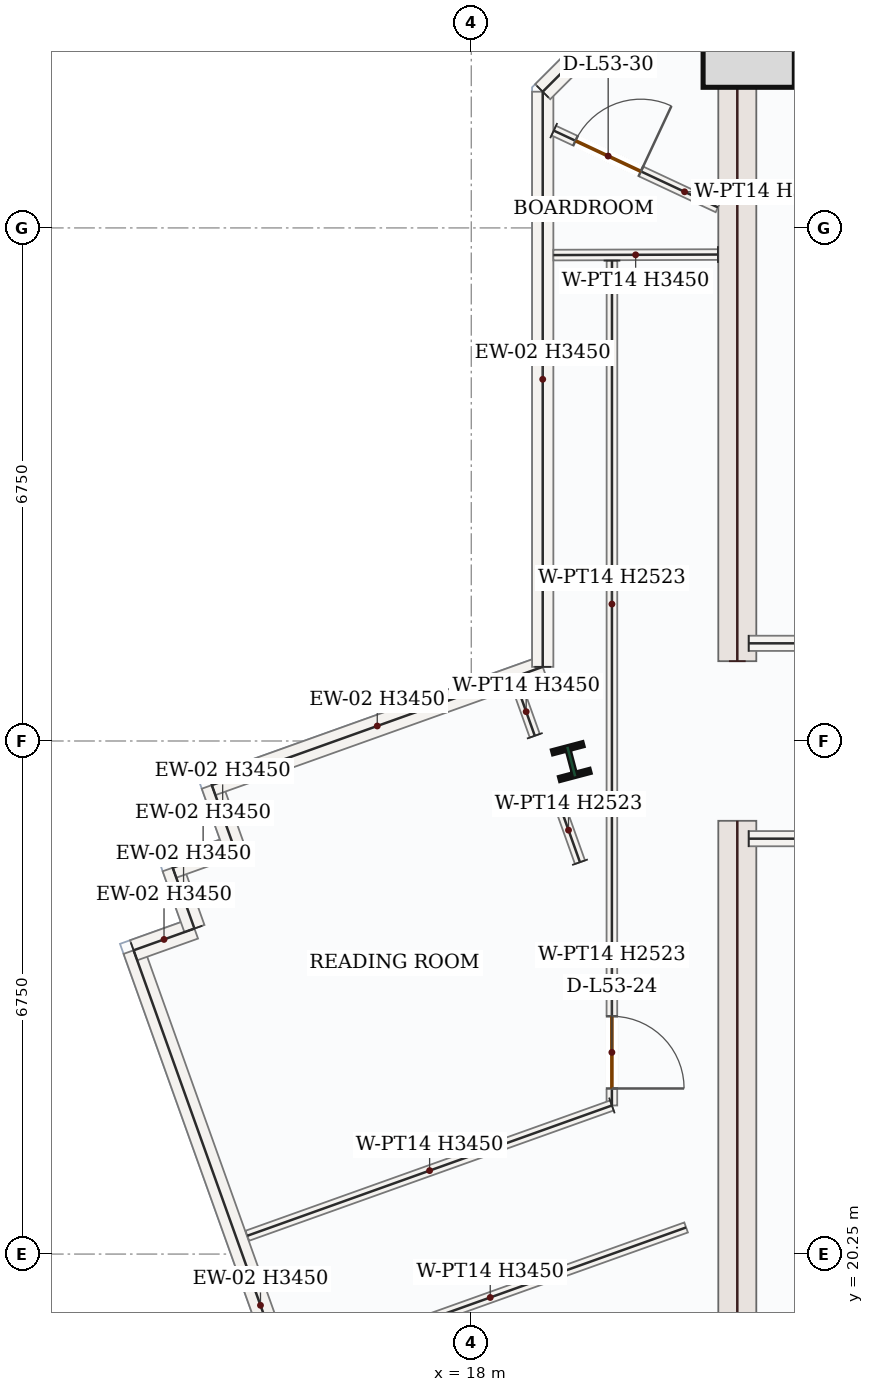
"""IFC4 building model, lengths in metres.
Left out: names, types, materials, properties, quantities, classifications, styles, units other than length and angle.
Written with IfcOpenShell. Run it as: python <this file> out.ifc"""

import sys

from ifc_helpers import new_model, si_unit, direction, frame, frame_2d, origin, origin_2d, place, context, subcontext, project, spatial, rectangle, i_section, extrude, source, transform, mapped, element, fill, save


model = new_model("IFC4")
c1 = context("Model", 3, precision=1e-05, world=origin(), true_north=direction((0.0, 1.0)))
c2 = subcontext(c1, "Body", "Model", "MODEL_VIEW")
j1 = project(units=[si_unit("LENGTHUNIT", "METRE"), si_unit("PLANEANGLEUNIT", "RADIAN")], contexts=[c1])
p1 = place(None, origin())
s1 = spatial("IfcSite", under=j1, at=p1, CompositionType="ELEMENT")
p2 = place(p1, origin())
s2 = spatial("IfcBuilding", under=s1, at=p2, CompositionType="ELEMENT")
p3 = place(p2, frame((0.0, 0.0, 225.3)))
s3 = spatial("IfcBuildingStorey", under=s2, at=p3, CompositionType="ELEMENT", Elevation=225.3)
m1 = source(origin(), c2, "Body", "SweptSolid", [
    extrude(rectangle(XDim=8.55, YDim=0.5, at=frame_2d((4.275, 0.0))), origin(), (0.0, 0.0, 1.0), 3.45),
])
for number, where, z_axis, x_axis in (
    (1, (21.5, 17.4, 0.0), (0.0, 0.0, 1.0), (0.0, 1.0, 0.0)),
    (2, (21.5, 28.05, 0.0), (0.0, 0.0, 1.0), (0.0, 1.0, 0.0)),
):
    element("IfcWall", number, at=place(p3, frame(where, z_axis=z_axis, x_axis=x_axis)), inside=s3, PredefinedType="SHEAR", context=c2, shape_type="MappedRepresentation", body=[
        mapped(m1, transform((0.0, 0.0, 0.0), x_axis=(1.0, 0.0, 0.0), y_axis=(0.0, 1.0, 0.0), z_axis=(0.0, 0.0, 1.0), scale=1.0)),
    ])
m2 = source(origin(), c2, "Body", "SweptSolid", [
    extrude(rectangle(XDim=1.2, YDim=1.2, at=origin_2d()), origin(), (0.0, 0.0, 1.0), 3.9),
])
p4 = place(p3, frame((21.65, 36.2, 0.0), z_axis=(0.0, 0.0, 1.0), x_axis=(1.0, 0.0, 0.0)))
e3 = element("IfcColumn", 3, at=p4, inside=s3, PredefinedType="COLUMN", context=c2, shape_type="MappedRepresentation", body=[
    mapped(m2, transform((0.0, 0.0, 0.0), x_axis=(1.0, 0.0, 0.0), y_axis=(0.0, 1.0, 0.0), z_axis=(0.0, 0.0, 1.0), scale=1.0)),
])
m3 = source(origin(), c2, "Body", "SweptSolid", [
    extrude(i_section(OverallWidth=0.404, OverallDepth=0.407, WebThickness=0.027, FlangeThickness=0.044, FilletRadius=0.018, at=origin_2d()), origin(), (0.0, 0.0, 1.0), 3.9),
])
p5 = place(p3, frame((19.316, 26.729, 0.0), z_axis=(0.0, 0.0, 1.0), x_axis=(0.966823388604, 0.255445757936, 0.0)))
e4 = element("IfcColumn", 4, at=p5, inside=s3, PredefinedType="COLUMN", context=c2, shape_type="MappedRepresentation", body=[
    mapped(m3, transform((0.0, 0.0, 0.0), x_axis=(1.0, 0.0, 0.0), y_axis=(0.0, 1.0, 0.0), z_axis=(0.0, 0.0, 1.0), scale=1.0)),
])
m4 = source(origin(), c2, "Body", "SweptSolid", [
    extrude(rectangle(XDim=9.92, YDim=0.28, at=frame_2d((4.96, 0.0))), origin(), (0.0, 0.0, 1.0), 3.45),
])
p6 = place(p3, frame((16.896, 14.905, 0.0), z_axis=(0.0, 0.0, 1.0), x_axis=(-0.336532833412, 0.941671732631, 0.0)))
e5 = element("IfcWall", 5, at=p6, inside=s3, PredefinedType="SOLIDWALL", context=c2, shape_type="MappedRepresentation", body=[
    mapped(m4, transform((0.0, 0.0, 0.0), x_axis=(1.0, 0.0, 0.0), y_axis=(0.0, 1.0, 0.0), z_axis=(0.0, 0.0, 1.0), scale=1.0)),
])
m5 = source(origin(), c2, "Body", "SweptSolid", [
    extrude(rectangle(XDim=0.85, YDim=0.28, at=frame_2d((0.425, 0.0))), origin(), (0.0, 0.0, 1.0), 3.45),
])
p7 = place(p3, frame((13.558, 24.246, 0.0), z_axis=(0.0, 0.0, 1.0), x_axis=(0.941624872587, 0.33666392638, 0.0)))
e6 = element("IfcWall", 6, at=p7, inside=s3, PredefinedType="SOLIDWALL", context=c2, shape_type="MappedRepresentation", body=[
    mapped(m5, transform((0.0, 0.0, 0.0), x_axis=(1.0, 0.0, 0.0), y_axis=(0.0, 1.0, 0.0), z_axis=(0.0, 0.0, 1.0), scale=1.0)),
])
m6 = source(origin(), c2, "Body", "SweptSolid", [
    extrude(rectangle(XDim=0.85, YDim=0.28, at=frame_2d((0.425, 0.0))), origin(), (0.0, 0.0, 1.0), 3.45),
])
p8 = place(p3, frame((14.358, 24.532, 0.0), z_axis=(0.0, 0.0, 1.0), x_axis=(-0.336318202891, 0.941748409292, 0.0)))
e7 = element("IfcWall", 7, at=p8, inside=s3, PredefinedType="SOLIDWALL", context=c2, shape_type="MappedRepresentation", body=[
    mapped(m6, transform((0.0, 0.0, 0.0), x_axis=(1.0, 0.0, 0.0), y_axis=(0.0, 1.0, 0.0), z_axis=(0.0, 0.0, 1.0), scale=1.0)),
])
p9 = place(p3, frame((14.072, 25.333, 0.0), z_axis=(0.0, 0.0, 1.0), x_axis=(0.941715910258, 0.336409191858, 0.0)))
e8 = element("IfcWall", 8, at=p9, inside=s3, PredefinedType="SOLIDWALL", context=c2, shape_type="MappedRepresentation", body=[
    mapped(m5, transform((0.0, 0.0, 0.0), x_axis=(1.0, 0.0, 0.0), y_axis=(0.0, 1.0, 0.0), z_axis=(0.0, 0.0, 1.0), scale=1.0)),
])
p10 = place(p3, frame((14.872, 25.619, 0.0), z_axis=(0.0, 0.0, 1.0), x_axis=(-0.336572886112, 0.941657417713, 0.0)))
e9 = element("IfcWall", 9, at=p10, inside=s3, PredefinedType="SOLIDWALL", context=c2, shape_type="MappedRepresentation", body=[
    mapped(m6, transform((0.0, 0.0, 0.0), x_axis=(1.0, 0.0, 0.0), y_axis=(0.0, 1.0, 0.0), z_axis=(0.0, 0.0, 1.0), scale=1.0)),
])
m7 = source(origin(), c2, "Body", "SweptSolid", [
    extrude(rectangle(XDim=4.624, YDim=0.28, at=frame_2d((2.312, 0.0))), origin(), (0.0, 0.0, 1.0), 3.45),
])
p11 = place(p3, frame((14.586, 26.419, 0.0), z_axis=(0.0, 0.0, 1.0), x_axis=(0.941673795185, 0.336527062004, 0.0)))
e10 = element("IfcWall", 10, at=p11, inside=s3, PredefinedType="SOLIDWALL", context=c2, shape_type="MappedRepresentation", body=[
    mapped(m7, transform((0.0, 0.0, 0.0), x_axis=(1.0, 0.0, 0.0), y_axis=(0.0, 1.0, 0.0), z_axis=(0.0, 0.0, 1.0), scale=1.0)),
])
m8 = source(origin(), c2, "Body", "SweptSolid", [
    extrude(rectangle(XDim=7.567, YDim=0.28, at=frame_2d((3.783, 0.0))), origin(), (0.0, 0.0, 1.0), 3.45),
])
p12 = place(p3, frame((18.94, 27.975, 0.0), z_axis=(0.0, 0.0, 1.0), x_axis=(0.0, 1.0, 0.0)))
e11 = element("IfcWall", 11, at=p12, inside=s3, PredefinedType="SOLIDWALL", context=c2, shape_type="MappedRepresentation", body=[
    mapped(m8, transform((0.0, 0.0, 0.0), x_axis=(1.0, 0.0, 0.0), y_axis=(0.0, 1.0, 0.0), z_axis=(0.0, 0.0, 1.0), scale=1.0)),
])
m9 = source(origin(), c2, "Body", "SweptSolid", [
    extrude(rectangle(XDim=5.258, YDim=0.28, at=frame_2d((2.629, 0.0))), origin(), (0.0, 0.0, 1.0), 3.45),
])
p13 = place(p3, frame((18.94, 35.542, 0.0), z_axis=(0.0, 0.0, 1.0), x_axis=(0.707106781187, 0.707106781187, 0.0)))
e12 = element("IfcWall", 12, at=p13, inside=s3, PredefinedType="SOLIDWALL", context=c2, shape_type="MappedRepresentation", body=[
    mapped(m9, transform((0.0, 0.0, 0.0), x_axis=(1.0, 0.0, 0.0), y_axis=(0.0, 1.0, 0.0), z_axis=(0.0, 0.0, 1.0), scale=1.0)),
])
m10 = source(origin(), c2, "Body", "SweptSolid", [
    extrude(rectangle(XDim=4.25, YDim=0.2, at=frame_2d((2.125, 0.0))), origin(), (0.0, 0.0, 1.0), 3.45),
])
for number, where, z_axis, x_axis in (
    (13, (21.65, 25.715, 0.0), (0.0, 0.0, 1.0), (1.0, 0.0, 0.0)),
    (14, (21.65, 28.285, 0.0), (0.0, 0.0, 1.0), (1.0, 0.0, 0.0)),
):
    element("IfcWall", number, at=place(p3, frame(where, z_axis=z_axis, x_axis=x_axis)), inside=s3, PredefinedType="SOLIDWALL", context=c2, shape_type="MappedRepresentation", body=[
        mapped(m10, transform((0.0, 0.0, 0.0), x_axis=(1.0, 0.0, 0.0), y_axis=(0.0, 1.0, 0.0), z_axis=(0.0, 0.0, 1.0), scale=1.0)),
    ])
m11 = source(origin(), c2, "Body", "SweptSolid", [
    extrude(rectangle(XDim=2.165, YDim=0.14, at=frame_2d((1.083, 0.0))), origin(), (0.0, 0.0, 1.0), 3.45),
])
p14 = place(p3, frame((21.245, 33.4, 0.0), z_axis=(0.0, 0.0, 1.0), x_axis=(-0.999994277874, -0.003382930575, 0.0)))
e15 = element("IfcWall", 15, at=p14, inside=s3, PredefinedType="PARTITIONING", context=c2, shape_type="MappedRepresentation", body=[
    mapped(m11, transform((0.0, 0.0, 0.0), x_axis=(1.0, 0.0, 0.0), y_axis=(0.0, 1.0, 0.0), z_axis=(0.0, 0.0, 1.0), scale=1.0)),
])
m12 = source(origin(), c2, "Body", "SweptSolid", [
    extrude(rectangle(XDim=9.038, YDim=0.14, at=frame_2d((4.519, 0.0))), origin(), (0.0, 0.0, 1.0), 2.523),
])
p15 = place(p3, frame((19.851, 33.32, 0.0), z_axis=(0.0, 0.0, 1.0), x_axis=(-0.000135065776, -0.999999990879, 0.0)))
e16 = element("IfcWall", 16, at=p15, inside=s3, PredefinedType="PARTITIONING", context=c2, shape_type="MappedRepresentation", body=[
    mapped(m12, transform((0.0, 0.0, 0.0), x_axis=(1.0, 0.0, 0.0), y_axis=(0.0, 1.0, 0.0), z_axis=(0.0, 0.0, 1.0), scale=1.0)),
])
m13 = source(origin(), c2, "Body", "SweptSolid", [
    extrude(rectangle(XDim=0.896, YDim=0.14, at=frame_2d((0.448, 0.0))), origin(), (0.0, 0.0, 1.0), 2.523),
])
p16 = place(p3, frame((19.43, 25.405, 0.0), z_axis=(0.0, 0.0, 1.0), x_axis=(-0.336509001165, 0.941680249413, 0.0)))
e17 = element("IfcWall", 17, at=p16, inside=s3, PredefinedType="PARTITIONING", context=c2, shape_type="MappedRepresentation", body=[
    mapped(m13, transform((0.0, 0.0, 0.0), x_axis=(1.0, 0.0, 0.0), y_axis=(0.0, 1.0, 0.0), z_axis=(0.0, 0.0, 1.0), scale=1.0)),
])
m14 = source(origin(), c2, "Body", "SweptSolid", [
    extrude(rectangle(XDim=0.674, YDim=0.14, at=frame_2d((0.337, 0.0))), origin(), (0.0, 0.0, 1.0), 3.45),
])
p17 = place(p3, frame((18.836, 27.069, 0.0), z_axis=(0.0, 0.0, 1.0), x_axis=(-0.336588856473, 0.941651709337, 0.0)))
e18 = element("IfcWall", 18, at=p17, inside=s3, PredefinedType="PARTITIONING", context=c2, shape_type="MappedRepresentation", body=[
    mapped(m14, transform((0.0, 0.0, 0.0), x_axis=(1.0, 0.0, 0.0), y_axis=(0.0, 1.0, 0.0), z_axis=(0.0, 0.0, 1.0), scale=1.0)),
])
p18 = place(p3, frame((19.085, 35.03, 0.0), z_axis=(0.0, 0.0, 1.0), x_axis=(0.905832355445, -0.423636334407, 0.0)))
e19 = element("IfcWall", 19, at=p18, inside=s3, PredefinedType="PARTITIONING", context=c2, shape_type="SweptSolid", body=[
    extrude(rectangle(XDim=2.385, YDim=0.14, at=frame_2d((1.192, 0.0))), origin(), (0.0, 0.0, 1.0), 3.45),
])
p19 = place(p18, frame((0.316, 0.0, 0.0)))
e20 = element("IfcOpeningElement", 20, at=p19, cuts=e19, PredefinedType="OPENING", context=c2, shape_type="SweptSolid", body=[
    extrude(rectangle(XDim=0.95, YDim=2.15, at=frame_2d((0.475, 1.075))), frame((0.0, 0.08, 0.0), z_axis=(0.0, -1.0, 0.0), x_axis=(1.0, 0.0, 0.0)), (0.0, 0.0, 1.0), 0.16),
])
p20 = place(p3, frame((19.85, 24.171, 0.0), z_axis=(0.0, 0.0, 1.0), x_axis=(0.0, -1.0, 0.0)))
e21 = element("IfcWall", 21, at=p20, inside=s3, PredefinedType="PARTITIONING", context=c2, shape_type="SweptSolid", body=[
    extrude(rectangle(XDim=1.966, YDim=0.14, at=frame_2d((0.983, 0.0))), origin(), (0.0, 0.0, 1.0), 2.523),
])
p21 = place(p20, frame((0.792, 0.0, 0.0)))
e22 = element("IfcOpeningElement", 22, at=p21, cuts=e21, PredefinedType="OPENING", context=c2, shape_type="SweptSolid", body=[
    extrude(rectangle(XDim=0.95, YDim=2.15, at=frame_2d((0.475, 1.075))), frame((0.0, 0.08, 0.0), z_axis=(0.0, -1.0, 0.0), x_axis=(1.0, 0.0, 0.0)), (0.0, 0.0, 1.0), 0.16),
])
m15 = source(origin(), c2, "Body", "SweptSolid", [
    extrude(rectangle(XDim=5.093, YDim=0.14, at=frame_2d((2.547, 0.0))), origin(), (0.0, 0.0, 1.0), 3.45),
])
p22 = place(p3, frame((19.85, 22.205, 0.0), z_axis=(0.0, 0.0, 1.0), x_axis=(-0.941667058904, -0.336545910947, 0.0)))
e23 = element("IfcWall", 23, at=p22, inside=s3, PredefinedType="PARTITIONING", context=c2, shape_type="MappedRepresentation", body=[
    mapped(m15, transform((0.0, 0.0, 0.0), x_axis=(1.0, 0.0, 0.0), y_axis=(0.0, 1.0, 0.0), z_axis=(0.0, 0.0, 1.0), scale=1.0)),
])
m16 = source(origin(), c2, "Body", "SweptSolid", [
    extrude(rectangle(XDim=5.473, YDim=0.14, at=frame_2d((2.736, 0.0))), origin(), (0.0, 0.0, 1.0), 3.45),
])
p23 = place(p3, frame((15.673, 18.758, 0.0), z_axis=(0.0, 0.0, 1.0), x_axis=(0.941665179086, 0.336551170695, 0.0)))
e24 = element("IfcWall", 24, at=p23, inside=s3, PredefinedType="PARTITIONING", context=c2, shape_type="MappedRepresentation", body=[
    mapped(m16, transform((0.0, 0.0, 0.0), x_axis=(1.0, 0.0, 0.0), y_axis=(0.0, 1.0, 0.0), z_axis=(0.0, 0.0, 1.0), scale=1.0)),
])
m17 = source(origin(), c2, "Body", "SweptSolid", [
    extrude(rectangle(XDim=0.95, YDim=2.15, at=frame_2d((0.475, 1.075))), frame((0.0, 0.025, 0.0), z_axis=(0.0, -1.0, 0.0), x_axis=(1.0, 0.0, 0.0)), (0.0, 0.0, 1.0), 0.05),
])
p24 = place(p21, origin())
e25 = element("IfcDoor", 25, at=p24, inside=s3, OperationType="SINGLE_SWING_RIGHT", PredefinedType="DOOR", context=c2, shape_type="MappedRepresentation", body=[
    mapped(m17, transform((0.0, 0.0, 0.0), x_axis=(1.0, 0.0, 0.0), y_axis=(0.0, 1.0, 0.0), z_axis=(0.0, 0.0, 1.0), scale=1.0)),
])
fill(e22, e25)
p25 = place(p19, origin())
e26 = element("IfcDoor", 26, at=p25, inside=s3, OperationType="SINGLE_SWING_RIGHT", PredefinedType="DOOR", context=c2, shape_type="MappedRepresentation", body=[
    mapped(m17, transform((0.0, 0.0, 0.0), x_axis=(1.0, 0.0, 0.0), y_axis=(0.0, 1.0, 0.0), z_axis=(0.0, 0.0, 1.0), scale=1.0)),
])
fill(e20, e26)
save(model, sys.argv[1])
